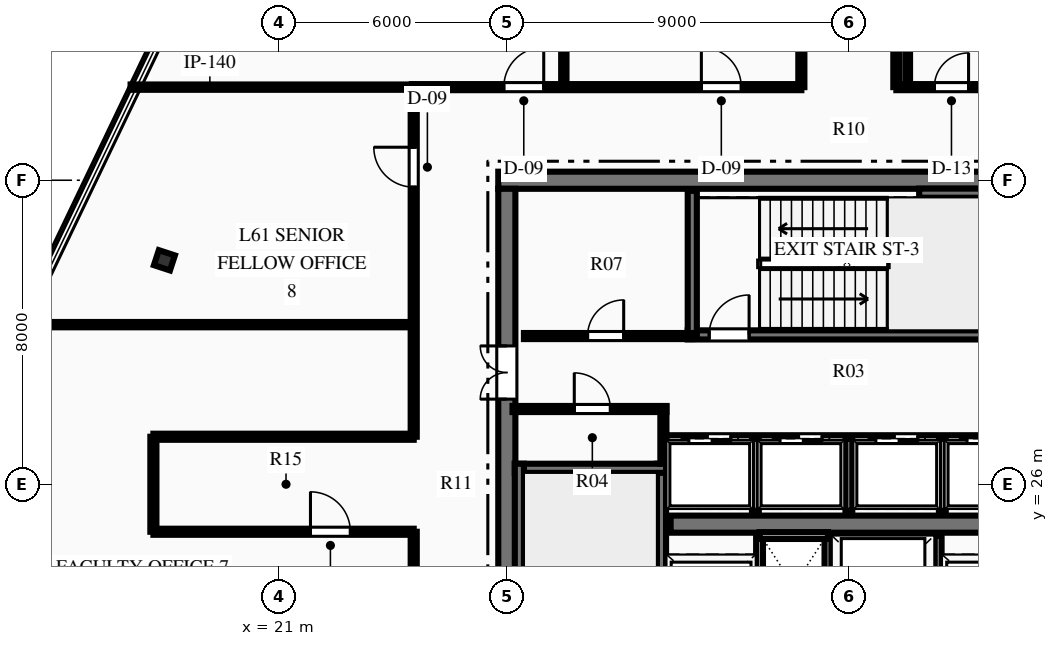
"""IFC4 building model, lengths in metres.
Left out: names, types, materials, properties, quantities, classifications, styles, units other than length and angle.
Written with IfcOpenShell. Run it as: python <this file> out.ifc"""

import sys

from ifc_helpers import new_model, si_unit, direction, frame, frame_2d, origin, origin_2d, place, context, subcontext, project, spatial, rectangle, i_section, extrude, element, fill, save


model = new_model("IFC4")
c1 = context("Model", 3, precision=1e-05, world=origin(), true_north=direction((0.0, 1.0)))
c2 = subcontext(c1, "Body", "Model", "MODEL_VIEW")
j1 = project(units=[si_unit("LENGTHUNIT", "METRE"), si_unit("PLANEANGLEUNIT", "RADIAN")], contexts=[c1])
p1 = place(None, origin())
s1 = spatial("IfcSite", under=j1, at=p1, CompositionType="ELEMENT")
p2 = place(p1, origin())
s2 = spatial("IfcBuilding", under=s1, at=p2, CompositionType="ELEMENT")
p3 = place(p2, frame((0.0, 0.0, 244.2)))
s3 = spatial("IfcBuildingStorey", under=s2, at=p3, CompositionType="ELEMENT", Elevation=244.2)
p4 = place(p3, frame((26.775, 34.0, 0.0), z_axis=(0.0, 0.0, 1.0), x_axis=(1.0, 0.0, 0.0)))
e1 = element("IfcWall", 1, at=p4, inside=s3, PredefinedType="SHEAR", context=c2, shape_type="SweptSolid", body=[
    extrude(rectangle(XDim=18.45, YDim=0.45, at=frame_2d((9.225, 0.0))), origin(), (0.0, 0.0, 1.0), 4.5),
])
p5 = place(p3, frame((27.0, 18.225, 0.0), z_axis=(0.0, 0.0, 1.0), x_axis=(0.0, 1.0, 0.0)))
e2 = element("IfcWall", 2, at=p5, inside=s3, PredefinedType="SHEAR", context=c2, shape_type="SweptSolid", body=[
    extrude(rectangle(XDim=15.55, YDim=0.45, at=frame_2d((7.775, 0.0))), origin(), (0.0, 0.0, 1.0), 4.5),
])
p6 = place(p5, frame((10.015, 0.0, 0.0)))
e3 = element("IfcOpeningElement", 3, at=p6, cuts=e2, PredefinedType="OPENING", context=c2, shape_type="SweptSolid", body=[
    extrude(rectangle(XDim=1.4, YDim=2.2, at=frame_2d((0.7, 1.1))), frame((0.0, 0.235, 0.0), z_axis=(0.0, -1.0, 0.0), x_axis=(1.0, 0.0, 0.0)), (0.0, 0.0, 1.0), 0.47),
])
p7 = place(p3, frame((31.31, 24.95, 0.0), z_axis=(0.0, 0.0, 1.0), x_axis=(1.0, 0.0, 0.0)))
e4 = element("IfcWall", 4, at=p7, inside=s3, PredefinedType="SHEAR", context=c2, shape_type="SweptSolid", body=[
    extrude(rectangle(XDim=9.38, YDim=0.45, at=frame_2d((4.69, 0.0))), origin(), (0.0, 0.0, 1.0), 4.5),
])
p8 = place(p3, frame((31.07, 18.28, 0.0), z_axis=(0.0, 0.0, 1.0), x_axis=(0.0, 1.0, 0.0)))
e5 = element("IfcWall", 5, at=p8, inside=s3, PredefinedType="SHEAR", context=c2, shape_type="SweptSolid", body=[
    extrude(rectangle(XDim=8.26, YDim=0.24, at=frame_2d((4.13, 0.0))), origin(), (0.0, 0.0, 1.0), 4.5),
])
p9 = place(p8, frame((0.365, 0.0, 0.0)))
e6 = element("IfcOpeningElement", 6, at=p9, cuts=e5, PredefinedType="OPENING", context=c2, shape_type="SweptSolid", body=[
    extrude(rectangle(XDim=1.05, YDim=2.15, at=frame_2d((0.525, 1.075))), frame((0.0, 0.13, 0.0), z_axis=(0.0, -1.0, 0.0), x_axis=(1.0, 0.0, 0.0)), (0.0, 0.0, 1.0), 0.26),
])
p10 = place(p3, frame((27.21, 26.42, 0.0), z_axis=(0.0, 0.0, 1.0), x_axis=(1.0, 0.0, 0.0)))
e7 = element("IfcWall", 7, at=p10, inside=s3, PredefinedType="SHEAR", context=c2, shape_type="SweptSolid", body=[
    extrude(rectangle(XDim=3.98, YDim=0.24, at=frame_2d((1.99, 0.0))), origin(), (0.0, 0.0, 1.0), 4.5),
])
p11 = place(p3, frame((27.33, 18.28, 0.0), z_axis=(0.0, 0.0, 1.0), x_axis=(0.0, 1.0, 0.0)))
e8 = element("IfcWall", 8, at=p11, inside=s3, PredefinedType="SHEAR", context=c2, shape_type="SweptSolid", body=[
    extrude(rectangle(XDim=8.26, YDim=0.24, at=frame_2d((4.13, 0.0))), origin(), (0.0, 0.0, 1.0), 4.5),
])
p12 = place(p3, frame((31.76, 29.93, 0.0), z_axis=(0.0, 0.0, 1.0), x_axis=(1.0, 0.0, 0.0)))
e9 = element("IfcWall", 9, at=p12, inside=s3, PredefinedType="SHEAR", context=c2, shape_type="SweptSolid", body=[
    extrude(rectangle(XDim=8.38, YDim=0.24, at=frame_2d((4.19, 0.0))), origin(), (0.0, 0.0, 1.0), 4.5),
])
p13 = place(p12, frame((0.565, 0.0, 0.0)))
e10 = element("IfcOpeningElement", 10, at=p13, cuts=e9, PredefinedType="OPENING", context=c2, shape_type="SweptSolid", body=[
    extrude(rectangle(XDim=1.05, YDim=2.15, at=frame_2d((0.525, 1.075))), frame((0.0, 0.13, 0.0), z_axis=(0.0, -1.0, 0.0), x_axis=(1.0, 0.0, 0.0)), (0.0, 0.0, 1.0), 0.26),
])
p14 = place(p3, frame((31.88, 29.93, 0.0), z_axis=(0.0, 0.0, 1.0), x_axis=(0.0, 1.0, 0.0)))
e11 = element("IfcWall", 11, at=p14, inside=s3, PredefinedType="SHEAR", context=c2, shape_type="SweptSolid", body=[
    extrude(rectangle(XDim=3.79, YDim=0.24, at=frame_2d((1.895, 0.0))), origin(), (0.0, 0.0, 1.0), 4.5),
])
p15 = place(p3, frame((37.85, 33.66, 0.0), z_axis=(0.0, 0.0, 1.0), x_axis=(1.0, 0.0, 0.0)))
e12 = element("IfcWall", 12, at=p15, inside=s3, PredefinedType="SHEAR", context=c2, shape_type="SweptSolid", body=[
    extrude(rectangle(XDim=2.29, YDim=0.24, at=frame_2d((1.145, 0.0))), origin(), (0.0, 0.0, 1.0), 4.5),
])
p16 = place(p3, frame((17.99, 31.894, 0.0), z_axis=(0.0, 0.0, 1.0), x_axis=(0.311008203279, 0.950407227189, 0.0)))
e13 = element("IfcColumn", 13, at=p16, inside=s3, PredefinedType="COLUMN", context=c2, shape_type="SweptSolid", body=[
    extrude(i_section(OverallWidth=0.416, OverallDepth=0.445, WebThickness=0.039, FlangeThickness=0.063, at=origin_2d()), origin(), (0.0, 0.0, 1.0), 4.5),
])
for number, where, z_axis, x_axis in (
    (14, (33.65, 22.05, 0.0), (0.0, 0.0, 1.0), (0.0, 1.0, 0.0)),
    (15, (35.45, 22.05, 0.0), (0.0, 0.0, 1.0), (0.0, 1.0, 0.0)),
):
    element("IfcWall", number, at=place(p3, frame(where, z_axis=z_axis, x_axis=x_axis)), inside=s3, PredefinedType="PARTITIONING", context=c2, shape_type="SweptSolid", body=[
        extrude(rectangle(XDim=2.6, YDim=0.18, at=frame_2d((1.3, 0.0))), origin(), (0.0, 0.0, 1.0), 4.23),
    ])
p17 = place(p3, frame((33.65, 24.65, 0.0), z_axis=(0.0, 0.0, 1.0), x_axis=(1.0, 0.0, 0.0)))
e16 = element("IfcWall", 16, at=p17, inside=s3, PredefinedType="PARTITIONING", context=c2, shape_type="SweptSolid", body=[
    extrude(rectangle(XDim=1.8, YDim=0.18, at=frame_2d((0.9, 0.0))), origin(), (0.0, 0.0, 1.0), 4.23),
])
p18 = place(p3, frame((38.35, 22.05, 0.0), z_axis=(0.0, 0.0, 1.0), x_axis=(0.0, 1.0, 0.0)))
e17 = element("IfcWall", 17, at=p18, inside=s3, PredefinedType="PARTITIONING", context=c2, shape_type="SweptSolid", body=[
    extrude(rectangle(XDim=2.6, YDim=0.18, at=frame_2d((1.3, 0.0))), origin(), (0.0, 0.0, 1.0), 4.23),
])
p19 = place(p3, frame((27.15, 27.98, 0.0), z_axis=(0.0, 0.0, 1.0), x_axis=(1.0, 0.0, 0.0)))
e18 = element("IfcWall", 18, at=p19, inside=s3, PredefinedType="PARTITIONING", context=c2, shape_type="SweptSolid", body=[
    extrude(rectangle(XDim=4.05, YDim=0.16, at=frame_2d((2.025, 0.0))), origin(), (0.0, 0.0, 1.0), 4.23),
])
p20 = place(p19, frame((1.625, 0.0, 0.0)))
e19 = element("IfcOpeningElement", 19, at=p20, cuts=e18, PredefinedType="OPENING", context=c2, shape_type="SweptSolid", body=[
    extrude(rectangle(XDim=0.95, YDim=2.15, at=frame_2d((0.475, 1.075))), frame((0.0, 0.09, 0.0), z_axis=(0.0, -1.0, 0.0), x_axis=(1.0, 0.0, 0.0)), (0.0, 0.0, 1.0), 0.18),
])
p21 = place(p3, frame((31.12, 26.54, 0.0), z_axis=(0.0, 0.0, 1.0), x_axis=(0.0, 1.0, 0.0)))
e20 = element("IfcWall", 20, at=p21, inside=s3, PredefinedType="PARTITIONING", context=c2, shape_type="SweptSolid", body=[
    extrude(rectangle(XDim=1.51, YDim=0.16, at=frame_2d((0.755, 0.0))), origin(), (0.0, 0.0, 1.0), 4.23),
])
p22 = place(p3, frame((27.45, 29.9, 0.0), z_axis=(0.0, 0.0, 1.0), x_axis=(1.0, 0.0, 0.0)))
e21 = element("IfcWall", 21, at=p22, inside=s3, PredefinedType="PARTITIONING", context=c2, shape_type="SweptSolid", body=[
    extrude(rectangle(XDim=4.43, YDim=0.16, at=frame_2d((2.215, 0.0))), origin(), (0.0, 0.0, 1.0), 4.23),
])
p23 = place(p22, frame((1.675, 0.0, 0.0)))
e22 = element("IfcOpeningElement", 22, at=p23, cuts=e21, PredefinedType="OPENING", context=c2, shape_type="SweptSolid", body=[
    extrude(rectangle(XDim=0.95, YDim=2.15, at=frame_2d((0.475, 1.075))), frame((0.0, 0.09, 0.0), z_axis=(0.0, -1.0, 0.0), x_axis=(1.0, 0.0, 0.0)), (0.0, 0.0, 1.0), 0.18),
])
p24 = place(p3, frame((31.2, 27.2, 0.0), z_axis=(0.0, 0.0, 1.0), x_axis=(1.0, 0.0, 0.0)))
e23 = element("IfcWall", 23, at=p24, inside=s3, PredefinedType="PARTITIONING", context=c2, shape_type="SweptSolid", body=[
    extrude(rectangle(XDim=9.6, YDim=0.18, at=frame_2d((4.8, 0.0))), origin(), (0.0, 0.0, 1.0), 4.23),
])
p25 = place(p24, frame((0.59, 0.0, 0.0)))
e24 = element("IfcOpeningElement", 24, at=p25, cuts=e23, PredefinedType="OPENING", context=c2, shape_type="SweptSolid", body=[
    extrude(rectangle(XDim=1.1, YDim=2.15, at=frame_2d((0.55, 1.075))), frame((0.0, 0.1, 0.0), z_axis=(0.0, -1.0, 0.0), x_axis=(1.0, 0.0, 0.0)), (0.0, 0.0, 1.0), 0.2),
])
p26 = place(p24, frame((2.99, 0.0, 0.0)))
e25 = element("IfcOpeningElement", 25, at=p26, cuts=e23, PredefinedType="OPENING", context=c2, shape_type="SweptSolid", body=[
    extrude(rectangle(XDim=1.1, YDim=2.15, at=frame_2d((0.55, 1.075))), frame((0.0, 0.1, 0.0), z_axis=(0.0, -1.0, 0.0), x_axis=(1.0, 0.0, 0.0)), (0.0, 0.0, 1.0), 0.2),
])
p27 = place(p24, frame((5.51, 0.0, 0.0)))
e26 = element("IfcOpeningElement", 26, at=p27, cuts=e23, PredefinedType="OPENING", context=c2, shape_type="SweptSolid", body=[
    extrude(rectangle(XDim=1.1, YDim=2.15, at=frame_2d((0.55, 1.075))), frame((0.0, 0.1, 0.0), z_axis=(0.0, -1.0, 0.0), x_axis=(1.0, 0.0, 0.0)), (0.0, 0.0, 1.0), 0.2),
])
p28 = place(p24, frame((7.91, 0.0, 0.0)))
e27 = element("IfcOpeningElement", 27, at=p28, cuts=e23, PredefinedType="OPENING", context=c2, shape_type="SweptSolid", body=[
    extrude(rectangle(XDim=1.1, YDim=2.15, at=frame_2d((0.55, 1.075))), frame((0.0, 0.1, 0.0), z_axis=(0.0, -1.0, 0.0), x_axis=(1.0, 0.0, 0.0)), (0.0, 0.0, 1.0), 0.2),
])
for number, where, z_axis, x_axis in (
    (28, (33.54, 25.3, 0.0), (0.0, 0.0, 1.0), (0.0, 1.0, 0.0)),
    (29, (36.0, 25.3, 0.0), (0.0, 0.0, 1.0), (0.0, 1.0, 0.0)),
    (30, (38.46, 25.3, 0.0), (0.0, 0.0, 1.0), (0.0, 1.0, 0.0)),
):
    element("IfcWall", number, at=place(p3, frame(where, z_axis=z_axis, x_axis=x_axis)), inside=s3, PredefinedType="PARTITIONING", context=c2, shape_type="SweptSolid", body=[
        extrude(rectangle(XDim=1.9, YDim=0.18, at=frame_2d((0.95, 0.0))), origin(), (0.0, 0.0, 1.0), 4.23),
    ])
p29 = place(p3, frame((24.5, 36.45, 0.0), z_axis=(0.0, 0.0, 1.0), x_axis=(1.0, 0.0, 0.0)))
e31 = element("IfcWall", 31, at=p29, inside=s3, PredefinedType="PARTITIONING", context=c2, shape_type="SweptSolid", body=[
    extrude(rectangle(XDim=10.25, YDim=0.16, at=frame_2d((5.125, 0.0))), origin(), (0.0, 0.0, 1.0), 4.23),
])
p30 = place(p29, frame((2.421, 0.0, 0.0)))
e32 = element("IfcOpeningElement", 32, at=p30, cuts=e31, PredefinedType="OPENING", context=c2, shape_type="SweptSolid", body=[
    extrude(rectangle(XDim=1.05, YDim=2.15, at=frame_2d((0.525, 1.075))), frame((0.0, 0.09, 0.0), z_axis=(0.0, -1.0, 0.0), x_axis=(1.0, 0.0, 0.0)), (0.0, 0.0, 1.0), 0.18),
])
p31 = place(p29, frame((7.619, 0.0, 0.0)))
e33 = element("IfcOpeningElement", 33, at=p31, cuts=e31, PredefinedType="OPENING", context=c2, shape_type="SweptSolid", body=[
    extrude(rectangle(XDim=1.05, YDim=2.15, at=frame_2d((0.525, 1.075))), frame((0.0, 0.09, 0.0), z_axis=(0.0, -1.0, 0.0), x_axis=(1.0, 0.0, 0.0)), (0.0, 0.0, 1.0), 0.18),
])
p32 = place(p3, frame((37.25, 36.45, 0.0), z_axis=(0.0, 0.0, 1.0), x_axis=(1.0, 0.0, 0.0)))
e34 = element("IfcWall", 34, at=p32, inside=s3, PredefinedType="PARTITIONING", context=c2, shape_type="SweptSolid", body=[
    extrude(rectangle(XDim=10.25, YDim=0.16, at=frame_2d((5.125, 0.0))), origin(), (0.0, 0.0, 1.0), 4.23),
])
p33 = place(p32, frame((1.0, 0.0, 0.0)))
e35 = element("IfcOpeningElement", 35, at=p33, cuts=e34, PredefinedType="OPENING", context=c2, shape_type="SweptSolid", body=[
    extrude(rectangle(XDim=0.9, YDim=2.15, at=frame_2d((0.45, 1.075))), frame((0.0, 0.09, 0.0), z_axis=(0.0, -1.0, 0.0), x_axis=(1.0, 0.0, 0.0)), (0.0, 0.0, 1.0), 0.18),
])
p34 = place(p32, frame((3.3, 0.0, 0.0)))
e36 = element("IfcOpeningElement", 36, at=p34, cuts=e34, PredefinedType="OPENING", context=c2, shape_type="SweptSolid", body=[
    extrude(rectangle(XDim=0.9, YDim=2.15, at=frame_2d((0.45, 1.075))), frame((0.0, 0.09, 0.0), z_axis=(0.0, -1.0, 0.0), x_axis=(1.0, 0.0, 0.0)), (0.0, 0.0, 1.0), 0.18),
])
p35 = place(p32, frame((5.55, 0.0, 0.0)))
e37 = element("IfcOpeningElement", 37, at=p35, cuts=e34, PredefinedType="OPENING", context=c2, shape_type="SweptSolid", body=[
    extrude(rectangle(XDim=1.0, YDim=2.15, at=frame_2d((0.5, 1.075))), frame((0.0, 0.09, 0.0), z_axis=(0.0, -1.0, 0.0), x_axis=(1.0, 0.0, 0.0)), (0.0, 0.0, 1.0), 0.18),
])
p36 = place(p3, frame((24.55, 15.55, 0.0), z_axis=(0.0, 0.0, 1.0), x_axis=(0.0, 1.0, 0.0)))
e38 = element("IfcWall", 38, at=p36, inside=s3, PredefinedType="PARTITIONING", context=c2, shape_type="SweptSolid", body=[
    extrude(rectangle(XDim=9.2, YDim=0.16, at=frame_2d((4.6, 0.0))), origin(), (0.0, 0.0, 1.0), 4.23),
])
p37 = place(p36, frame((3.407, 0.0, 0.0)))
e39 = element("IfcOpeningElement", 39, at=p37, cuts=e38, PredefinedType="OPENING", context=c2, shape_type="SweptSolid", body=[
    extrude(rectangle(XDim=1.05, YDim=2.15, at=frame_2d((0.525, 1.075))), frame((0.0, 0.09, 0.0), z_axis=(0.0, -1.0, 0.0), x_axis=(1.0, 0.0, 0.0)), (0.0, 0.0, 1.0), 0.18),
])
p38 = place(p3, frame((24.55, 27.25, 0.0), z_axis=(0.0, 0.0, 1.0), x_axis=(0.0, 1.0, 0.0)))
e40 = element("IfcWall", 40, at=p38, inside=s3, PredefinedType="PARTITIONING", context=c2, shape_type="SweptSolid", body=[
    extrude(rectangle(XDim=9.2, YDim=0.16, at=frame_2d((4.6, 0.0))), origin(), (0.0, 0.0, 1.0), 4.23),
])
p39 = place(p38, frame((6.569, 0.0, 0.0)))
e41 = element("IfcOpeningElement", 41, at=p39, cuts=e40, PredefinedType="OPENING", context=c2, shape_type="SweptSolid", body=[
    extrude(rectangle(XDim=1.05, YDim=2.15, at=frame_2d((0.525, 1.075))), frame((0.0, 0.09, 0.0), z_axis=(0.0, -1.0, 0.0), x_axis=(1.0, 0.0, 0.0)), (0.0, 0.0, 1.0), 0.18),
])
for number, where, z_axis, x_axis in (
    (42, (34.75, 36.45, 0.0), (0.0, 0.0, 1.0), (0.0, 1.0, 0.0)),
    (43, (37.25, 36.45, 0.0), (0.0, 0.0, 1.0), (0.0, 1.0, 0.0)),
):
    element("IfcWall", number, at=place(p3, frame(where, z_axis=z_axis, x_axis=x_axis)), inside=s3, PredefinedType="PARTITIONING", context=c2, shape_type="SweptSolid", body=[
        extrude(rectangle(XDim=6.45, YDim=0.16, at=frame_2d((3.225, 0.0))), origin(), (0.0, 0.0, 1.0), 4.23),
    ])
p40 = place(p3, frame((17.7, 24.75, 0.0), z_axis=(0.0, 0.0, 1.0), x_axis=(1.0, 0.0, 0.0)))
e44 = element("IfcWall", 44, at=p40, inside=s3, PredefinedType="PARTITIONING", context=c2, shape_type="SweptSolid", body=[
    extrude(rectangle(XDim=6.85, YDim=0.16, at=frame_2d((3.425, 0.0))), origin(), (0.0, 0.0, 1.0), 4.23),
])
p41 = place(p40, frame((4.133, 0.0, 0.0)))
e45 = element("IfcOpeningElement", 45, at=p41, cuts=e44, PredefinedType="OPENING", context=c2, shape_type="SweptSolid", body=[
    extrude(rectangle(XDim=1.05, YDim=2.15, at=frame_2d((0.525, 1.075))), frame((0.0, 0.09, 0.0), z_axis=(0.0, -1.0, 0.0), x_axis=(1.0, 0.0, 0.0)), (0.0, 0.0, 1.0), 0.18),
])
p42 = place(p3, frame((17.7, 27.25, 0.0), z_axis=(0.0, 0.0, 1.0), x_axis=(1.0, 0.0, 0.0)))
e46 = element("IfcWall", 46, at=p42, inside=s3, PredefinedType="PARTITIONING", context=c2, shape_type="SweptSolid", body=[
    extrude(rectangle(XDim=6.85, YDim=0.16, at=frame_2d((3.425, 0.0))), origin(), (0.0, 0.0, 1.0), 4.23),
])
p43 = place(p3, frame((17.7, 24.75, 0.0), z_axis=(0.0, 0.0, 1.0), x_axis=(0.0, 1.0, 0.0)))
e47 = element("IfcWall", 47, at=p43, inside=s3, PredefinedType="PARTITIONING", context=c2, shape_type="SweptSolid", body=[
    extrude(rectangle(XDim=2.5, YDim=0.16, at=frame_2d((1.25, 0.0))), origin(), (0.0, 0.0, 1.0), 4.23),
])
p44 = place(p3, frame((37.55, 36.45, 0.0), z_axis=(0.0, 0.0, 1.0), x_axis=(0.0, 1.0, 0.0)))
e48 = element("IfcWall", 48, at=p44, inside=s3, PredefinedType="PARTITIONING", context=c2, shape_type="SweptSolid", body=[
    extrude(rectangle(XDim=3.9, YDim=0.12, at=frame_2d((1.95, 0.0))), origin(), (0.0, 0.0, 1.0), 4.23),
])
p45 = place(p3, frame((17.1, 36.45, 0.0), z_axis=(0.0, 0.0, 1.0), x_axis=(1.0, 0.0, 0.0)))
e49 = element("IfcWall", 49, at=p45, inside=s3, PredefinedType="PARTITIONING", context=c2, shape_type="SweptSolid", body=[
    extrude(rectangle(XDim=7.45, YDim=0.14, at=frame_2d((3.725, 0.0))), origin(), (0.0, 0.0, 1.0), 4.23),
])
p46 = place(p3, frame((28.5, 36.45, 0.0), z_axis=(0.0, 0.0, 1.0), x_axis=(0.0, 1.0, 0.0)))
e50 = element("IfcWall", 50, at=p46, inside=s3, PredefinedType="PARTITIONING", context=c2, shape_type="SweptSolid", body=[
    extrude(rectangle(XDim=14.999, YDim=0.14, at=frame_2d((7.5, 0.0))), origin(), (0.0, 0.0, 1.0), 4.23),
])
p47 = place(p3, frame((14.105, 30.2, 0.0), z_axis=(0.0, 0.0, 1.0), x_axis=(1.0, 0.0, 0.0)))
e51 = element("IfcWall", 51, at=p47, inside=s3, PredefinedType="PARTITIONING", context=c2, shape_type="SweptSolid", body=[
    extrude(rectangle(XDim=10.445, YDim=0.14, at=frame_2d((5.222, 0.0))), origin(), (0.0, 0.0, 1.0), 4.23),
])
p48 = place(p20, origin())
e52 = element("IfcDoor", 52, at=p48, inside=s3, OperationType="SINGLE_SWING_LEFT", PredefinedType="DOOR", context=c2, shape_type="SweptSolid", body=[
    extrude(rectangle(XDim=0.95, YDim=2.15, at=frame_2d((0.475, 1.075))), frame((0.0, 0.025, 0.0), z_axis=(0.0, -1.0, 0.0), x_axis=(1.0, 0.0, 0.0)), (0.0, 0.0, 1.0), 0.05),
])
fill(e19, e52)
p49 = place(p23, origin())
e53 = element("IfcDoor", 53, at=p49, inside=s3, OperationType="SINGLE_SWING_RIGHT", PredefinedType="DOOR", context=c2, shape_type="SweptSolid", body=[
    extrude(rectangle(XDim=0.95, YDim=2.15, at=frame_2d((0.475, 1.075))), frame((0.0, 0.025, 0.0), z_axis=(0.0, -1.0, 0.0), x_axis=(1.0, 0.0, 0.0)), (0.0, 0.0, 1.0), 0.05),
])
fill(e22, e53)
p50 = place(p13, origin())
e54 = element("IfcDoor", 54, at=p50, inside=s3, OperationType="SINGLE_SWING_RIGHT", PredefinedType="DOOR", context=c2, shape_type="SweptSolid", body=[
    extrude(rectangle(XDim=1.05, YDim=2.15, at=frame_2d((0.525, 1.075))), frame((0.0, 0.025, 0.0), z_axis=(0.0, -1.0, 0.0), x_axis=(1.0, 0.0, 0.0)), (0.0, 0.0, 1.0), 0.05),
])
fill(e10, e54)
p51 = place(p6, origin())
e55 = element("IfcDoor", 55, at=p51, inside=s3, OperationType="DOUBLE_DOOR_SINGLE_SWING", PredefinedType="DOOR", context=c2, shape_type="SweptSolid", body=[
    extrude(rectangle(XDim=1.4, YDim=2.2, at=frame_2d((0.7, 1.1))), frame((0.0, 0.025, 0.0), z_axis=(0.0, -1.0, 0.0), x_axis=(1.0, 0.0, 0.0)), (0.0, 0.0, 1.0), 0.05),
])
fill(e3, e55)
p52 = place(p33, origin())
e56 = element("IfcDoor", 56, at=p52, inside=s3, OperationType="SINGLE_SWING_RIGHT", PredefinedType="DOOR", context=c2, shape_type="SweptSolid", body=[
    extrude(rectangle(XDim=0.9, YDim=2.15, at=frame_2d((0.45, 1.075))), frame((0.0, 0.025, 0.0), z_axis=(0.0, -1.0, 0.0), x_axis=(1.0, 0.0, 0.0)), (0.0, 0.0, 1.0), 0.05),
])
fill(e35, e56)
p53 = place(p30, origin())
e57 = element("IfcDoor", 57, at=p53, inside=s3, OperationType="SINGLE_SWING_RIGHT", PredefinedType="DOOR", context=c2, shape_type="SweptSolid", body=[
    extrude(rectangle(XDim=1.05, YDim=2.15, at=frame_2d((0.525, 1.075))), frame((0.0, 0.025, 0.0), z_axis=(0.0, -1.0, 0.0), x_axis=(1.0, 0.0, 0.0)), (0.0, 0.0, 1.0), 0.05),
])
fill(e32, e57)
p54 = place(p31, origin())
e58 = element("IfcDoor", 58, at=p54, inside=s3, OperationType="SINGLE_SWING_LEFT", PredefinedType="DOOR", context=c2, shape_type="SweptSolid", body=[
    extrude(rectangle(XDim=1.05, YDim=2.15, at=frame_2d((0.525, 1.075))), frame((0.0, 0.025, 0.0), z_axis=(0.0, -1.0, 0.0), x_axis=(1.0, 0.0, 0.0)), (0.0, 0.0, 1.0), 0.05),
])
fill(e33, e58)
p55 = place(p41, origin())
e59 = element("IfcDoor", 59, at=p55, inside=s3, OperationType="SINGLE_SWING_LEFT", PredefinedType="DOOR", context=c2, shape_type="SweptSolid", body=[
    extrude(rectangle(XDim=1.05, YDim=2.15, at=frame_2d((0.525, 1.075))), frame((0.0, 0.025, 0.0), z_axis=(0.0, -1.0, 0.0), x_axis=(1.0, 0.0, 0.0)), (0.0, 0.0, 1.0), 0.05),
])
fill(e45, e59)
p56 = place(p39, origin())
e60 = element("IfcDoor", 60, at=p56, inside=s3, OperationType="SINGLE_SWING_RIGHT", PredefinedType="DOOR", context=c2, shape_type="SweptSolid", body=[
    extrude(rectangle(XDim=1.05, YDim=2.15, at=frame_2d((0.525, 1.075))), frame((0.0, 0.025, 0.0), z_axis=(0.0, -1.0, 0.0), x_axis=(1.0, 0.0, 0.0)), (0.0, 0.0, 1.0), 0.05),
])
fill(e41, e60)
p57 = place(p25, origin())
e61 = element("IfcDoor", 61, at=p57, inside=s3, OperationType="SLIDING_TO_LEFT", PredefinedType="DOOR", context=c2, shape_type="SweptSolid", body=[
    extrude(rectangle(XDim=1.1, YDim=2.15, at=frame_2d((0.55, 1.075))), frame((0.0, 0.025, 0.0), z_axis=(0.0, -1.0, 0.0), x_axis=(1.0, 0.0, 0.0)), (0.0, 0.0, 1.0), 0.05),
])
fill(e24, e61)
p58 = place(p26, origin())
e62 = element("IfcDoor", 62, at=p58, inside=s3, OperationType="SLIDING_TO_LEFT", PredefinedType="DOOR", context=c2, shape_type="SweptSolid", body=[
    extrude(rectangle(XDim=1.1, YDim=2.15, at=frame_2d((0.55, 1.075))), frame((0.0, 0.025, 0.0), z_axis=(0.0, -1.0, 0.0), x_axis=(1.0, 0.0, 0.0)), (0.0, 0.0, 1.0), 0.05),
])
fill(e25, e62)
p59 = place(p27, origin())
e63 = element("IfcDoor", 63, at=p59, inside=s3, OperationType="SLIDING_TO_LEFT", PredefinedType="DOOR", context=c2, shape_type="SweptSolid", body=[
    extrude(rectangle(XDim=1.1, YDim=2.15, at=frame_2d((0.55, 1.075))), frame((0.0, 0.025, 0.0), z_axis=(0.0, -1.0, 0.0), x_axis=(1.0, 0.0, 0.0)), (0.0, 0.0, 1.0), 0.05),
])
fill(e26, e63)
p60 = place(p28, origin())
e64 = element("IfcDoor", 64, at=p60, inside=s3, OperationType="SLIDING_TO_LEFT", PredefinedType="DOOR", context=c2, shape_type="SweptSolid", body=[
    extrude(rectangle(XDim=1.1, YDim=2.15, at=frame_2d((0.55, 1.075))), frame((0.0, 0.025, 0.0), z_axis=(0.0, -1.0, 0.0), x_axis=(1.0, 0.0, 0.0)), (0.0, 0.0, 1.0), 0.05),
])
fill(e27, e64)
save(model, sys.argv[1])
